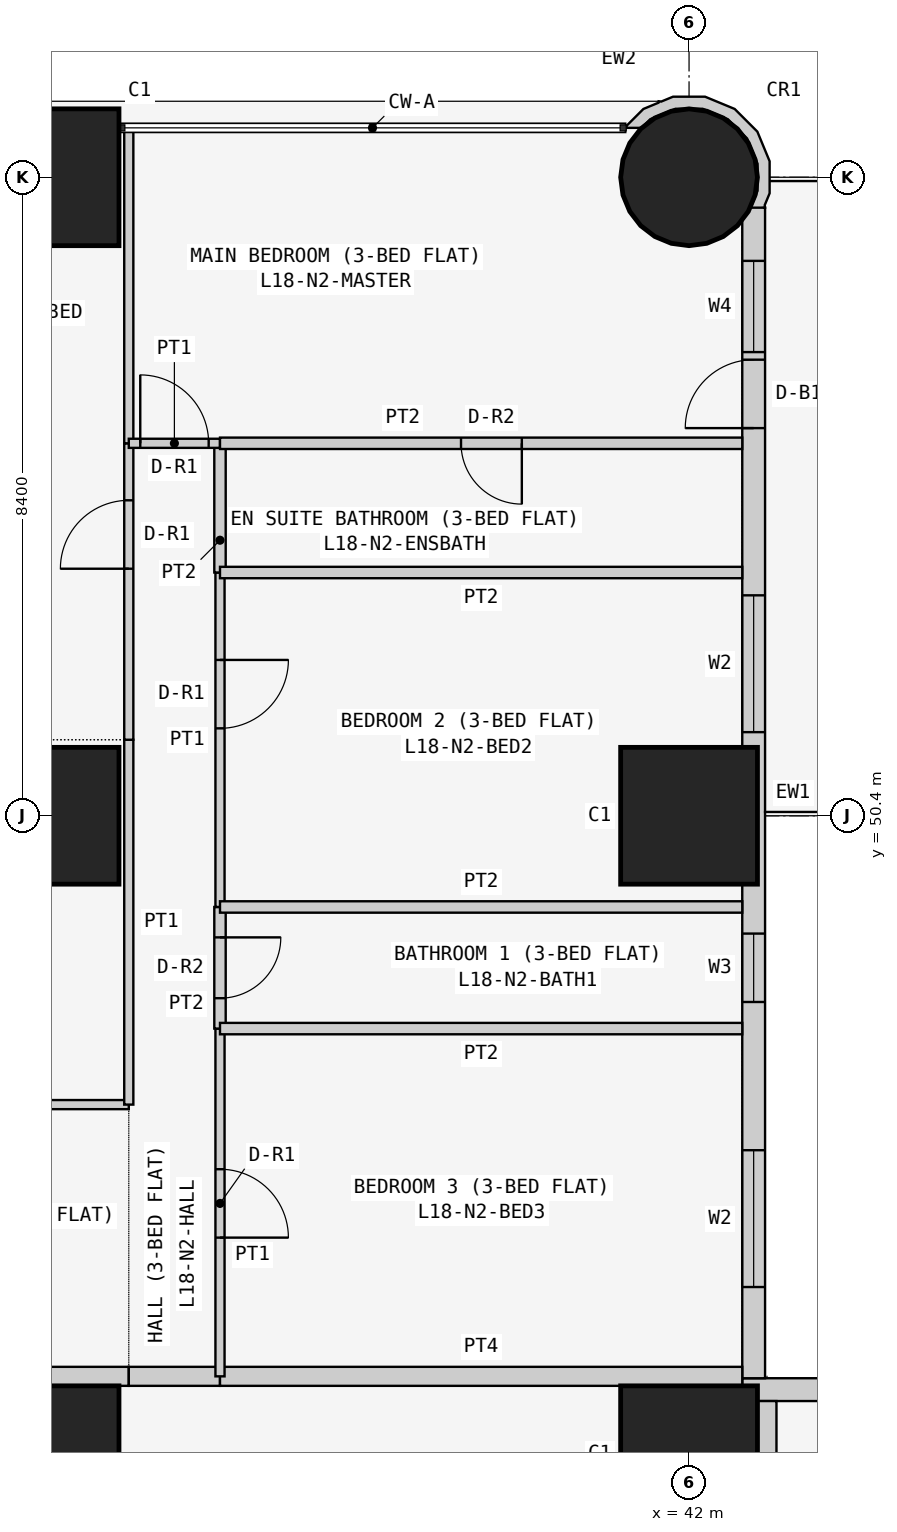
"""IFC4 building model, lengths in metres.
Left out: names, types, materials, properties, quantities, classifications, styles, units other than length and angle.
Written with IfcOpenShell. Run it as: python <this file> out.ifc"""

import sys

from ifc_helpers import new_model, si_unit, direction, frame, frame_2d, origin, origin_2d, place, context, subcontext, project, spatial, polyline, rectangle, circle, outline, extrude, element, fill, save


model = new_model("IFC4")
c1 = context("Model", 3, precision=1e-05, world=origin(), true_north=direction((0.0, 1.0)))
c2 = subcontext(c1, "Body", "Model", "MODEL_VIEW")
j1 = project(units=[si_unit("LENGTHUNIT", "METRE"), si_unit("PLANEANGLEUNIT", "RADIAN")], contexts=[c1])
p1 = place(None, origin())
s1 = spatial("IfcSite", under=j1, at=p1, CompositionType="ELEMENT")
p2 = place(p1, origin())
s2 = spatial("IfcBuilding", under=s1, at=p2, CompositionType="ELEMENT")
p3 = place(p2, frame((0.0, 0.0, 74.1)))
s3 = spatial("IfcBuildingStorey", under=s2, at=p3, CompositionType="ELEMENT", Elevation=74.1)
for number, where, z_axis, x_axis in (
    (1, (33.6, 42.0, 0.0), (0.0, 0.0, 1.0), (1.0, 0.0, 0.0)),
    (2, (33.6, 50.4, 0.0), (0.0, 0.0, 1.0), (1.0, 0.0, 0.0)),
    (3, (33.6, 58.8, 0.0), (0.0, 0.0, 1.0), (1.0, 0.0, 0.0)),
    (4, (42.0, 42.0, 0.0), (0.0, 0.0, 1.0), (1.0, 0.0, 0.0)),
    (5, (42.0, 50.4, 0.0), (0.0, 0.0, 1.0), (1.0, 0.0, 0.0)),
):
    element("IfcColumn", number, at=place(p3, frame(where, z_axis=z_axis, x_axis=x_axis)), inside=s3, PredefinedType="COLUMN", context=c2, shape_type="SweptSolid", body=[
        extrude(rectangle(XDim=1.8, YDim=1.8, at=origin_2d()), origin(), (0.0, 0.0, 1.0), 3.6),
    ])
p4 = place(p3, frame((42.0, 58.8, 0.0), z_axis=(0.0, 0.0, 1.0), x_axis=(1.0, 0.0, 0.0)))
e6 = element("IfcColumn", 6, at=p4, inside=s3, PredefinedType="COLUMN", context=c2, shape_type="SweptSolid", body=[
    extrude(circle(Radius=0.9, at=origin_2d()), origin(), (0.0, 0.0, 1.0), 3.6),
])
p5 = place(p3, frame((58.4, 42.85, 0.0), z_axis=(0.0, 0.0, 1.0), x_axis=(-1.0, 0.0, 0.0)))
e7 = element("IfcWall", 7, at=p5, inside=s3, PredefinedType="SOLIDWALL", context=c2, shape_type="SweptSolid", body=[
    extrude(rectangle(XDim=15.7, YDim=0.3, at=frame_2d((7.85, 0.0))), origin(), (0.0, 0.0, 1.0), 3.45),
])
p6 = place(p5, frame((12.4, 0.0, 0.9)))
e8 = element("IfcOpeningElement", 8, at=p6, cuts=e7, PredefinedType="OPENING", context=c2, shape_type="SweptSolid", body=[
    extrude(rectangle(XDim=1.8, YDim=1.5, at=frame_2d((0.9, 0.75))), frame((0.0, 0.16, 0.0), z_axis=(0.0, -1.0, 0.0), x_axis=(1.0, 0.0, 0.0)), (0.0, 0.0, 1.0), 0.32),
])
p7 = place(p5, frame((9.55, 0.0, 1.5)))
e9 = element("IfcOpeningElement", 9, at=p7, cuts=e7, PredefinedType="OPENING", context=c2, shape_type="SweptSolid", body=[
    extrude(rectangle(XDim=0.9, YDim=0.7, at=frame_2d((0.45, 0.35))), frame((0.0, 0.16, 0.0), z_axis=(0.0, -1.0, 0.0), x_axis=(1.0, 0.0, 0.0)), (0.0, 0.0, 1.0), 0.32),
])
p8 = place(p5, frame((5.1, 0.0, 0.9)))
e10 = element("IfcOpeningElement", 10, at=p8, cuts=e7, PredefinedType="OPENING", context=c2, shape_type="SweptSolid", body=[
    extrude(rectangle(XDim=1.8, YDim=1.5, at=frame_2d((0.9, 0.75))), frame((0.0, 0.16, 0.0), z_axis=(0.0, -1.0, 0.0), x_axis=(1.0, 0.0, 0.0)), (0.0, 0.0, 1.0), 0.32),
])
p9 = place(p5, frame((2.0, 0.0, 0.0)))
e11 = element("IfcOpeningElement", 11, at=p9, cuts=e7, PredefinedType="OPENING", context=c2, shape_type="SweptSolid", body=[
    extrude(rectangle(XDim=0.9, YDim=2.4, at=frame_2d((0.45, 1.2))), frame((0.0, 0.16, 0.0), z_axis=(0.0, -1.0, 0.0), x_axis=(1.0, 0.0, 0.0)), (0.0, 0.0, 1.0), 0.32),
])
p10 = place(p5, frame((0.7, 0.0, 0.9)))
e12 = element("IfcOpeningElement", 12, at=p10, cuts=e7, PredefinedType="OPENING", context=c2, shape_type="SweptSolid", body=[
    extrude(rectangle(XDim=1.2, YDim=1.5, at=frame_2d((0.6, 0.75))), frame((0.0, 0.16, 0.0), z_axis=(0.0, -1.0, 0.0), x_axis=(1.0, 0.0, 0.0)), (0.0, 0.0, 1.0), 0.32),
])
p11 = place(p3, frame((42.85, 43.0, 0.0), z_axis=(0.0, 0.0, 1.0), x_axis=(0.0, 1.0, 0.0)))
e13 = element("IfcWall", 13, at=p11, inside=s3, PredefinedType="SOLIDWALL", context=c2, shape_type="SweptSolid", body=[
    extrude(rectangle(XDim=15.4, YDim=0.3, at=frame_2d((7.7, 0.0))), origin(), (0.0, 0.0, 1.0), 3.45),
])
p12 = place(p11, frame((1.2, 0.0, 0.9)))
e14 = element("IfcOpeningElement", 14, at=p12, cuts=e13, PredefinedType="OPENING", context=c2, shape_type="SweptSolid", body=[
    extrude(rectangle(XDim=1.8, YDim=1.5, at=frame_2d((0.9, 0.75))), frame((0.0, 0.16, 0.0), z_axis=(0.0, -1.0, 0.0), x_axis=(1.0, 0.0, 0.0)), (0.0, 0.0, 1.0), 0.32),
])
p13 = place(p11, frame((4.95, 0.0, 1.5)))
e15 = element("IfcOpeningElement", 15, at=p13, cuts=e13, PredefinedType="OPENING", context=c2, shape_type="SweptSolid", body=[
    extrude(rectangle(XDim=0.9, YDim=0.7, at=frame_2d((0.45, 0.35))), frame((0.0, 0.16, 0.0), z_axis=(0.0, -1.0, 0.0), x_axis=(1.0, 0.0, 0.0)), (0.0, 0.0, 1.0), 0.32),
])
p14 = place(p11, frame((8.5, 0.0, 0.9)))
e16 = element("IfcOpeningElement", 16, at=p14, cuts=e13, PredefinedType="OPENING", context=c2, shape_type="SweptSolid", body=[
    extrude(rectangle(XDim=1.8, YDim=1.5, at=frame_2d((0.9, 0.75))), frame((0.0, 0.16, 0.0), z_axis=(0.0, -1.0, 0.0), x_axis=(1.0, 0.0, 0.0)), (0.0, 0.0, 1.0), 0.32),
])
p15 = place(p11, frame((12.5, 0.0, 0.0)))
e17 = element("IfcOpeningElement", 17, at=p15, cuts=e13, PredefinedType="OPENING", context=c2, shape_type="SweptSolid", body=[
    extrude(rectangle(XDim=0.9, YDim=2.4, at=frame_2d((0.45, 1.2))), frame((0.0, 0.16, 0.0), z_axis=(0.0, -1.0, 0.0), x_axis=(1.0, 0.0, 0.0)), (0.0, 0.0, 1.0), 0.32),
])
p16 = place(p11, frame((13.5, 0.0, 0.9)))
e18 = element("IfcOpeningElement", 18, at=p16, cuts=e13, PredefinedType="OPENING", context=c2, shape_type="SweptSolid", body=[
    extrude(rectangle(XDim=1.2, YDim=1.5, at=frame_2d((0.6, 0.75))), frame((0.0, 0.16, 0.0), z_axis=(0.0, -1.0, 0.0), x_axis=(1.0, 0.0, 0.0)), (0.0, 0.0, 1.0), 0.32),
])
p17 = place(p3, frame((42.91, 58.436, 0.0), z_axis=(0.0, 0.0, 1.0), x_axis=(0.377204953059, 0.926129809145, 0.0)))
e19 = element("IfcWall", 19, at=p17, inside=s3, PredefinedType="SOLIDWALL", context=c2, shape_type="SweptSolid", body=[
    extrude(outline(polyline([(0.769, 1.728), (0.75, 1.723), (0.6, 1.875), (0.295, 2.004), (0.281, 1.998), (0.36, 1.803), (0.509, 1.741), (0.761, 1.486), (0.896, 1.154), (0.894, 0.795), (0.755, 0.465), (0.5, 0.213), (0.168, 0.078), (-0.1, 0.08), (0.001, -0.097), (0.03, -0.08), (0.198, -0.081), (0.589, 0.078), (0.889, 0.374), (1.052, 0.763), (1.055, 1.185), (0.896, 1.575), (0.778, 1.695), (0.769, 1.728)])), origin(), (0.0, 0.0, 1.0), 3.45),
])
p18 = place(p3, frame((29.4, 43.025, 0.0), z_axis=(0.0, 0.0, 1.0), x_axis=(1.0, 0.0, 0.0)))
e20 = element("IfcWall", 20, at=p18, inside=s3, PredefinedType="PARTITIONING", context=c2, shape_type="SweptSolid", body=[
    extrude(rectangle(XDim=5.229, YDim=0.25, at=frame_2d((2.615, 0.0))), origin(), (0.0, 0.0, 1.0), 3.45),
])
p19 = place(p18, frame((2.1, 0.0, 0.0)))
e21 = element("IfcOpeningElement", 21, at=p19, cuts=e20, PredefinedType="OPENING", context=c2, shape_type="SweptSolid", body=[
    extrude(rectangle(XDim=1.0, YDim=2.1, at=frame_2d((0.5, 1.05))), frame((0.0, 0.135, 0.0), z_axis=(0.0, -1.0, 0.0), x_axis=(1.0, 0.0, 0.0)), (0.0, 0.0, 1.0), 0.27),
])
p20 = place(p3, frame((34.629, 43.025, 0.0), z_axis=(0.0, 0.0, 1.0), x_axis=(1.0, 0.0, 0.0)))
e22 = element("IfcWall", 22, at=p20, inside=s3, PredefinedType="PARTITIONING", context=c2, shape_type="SweptSolid", body=[
    extrude(rectangle(XDim=1.2, YDim=0.25, at=frame_2d((0.6, 0.0))), origin(), (0.0, 0.0, 1.0), 3.45),
])
for number, where, z_axis, x_axis in (
    (23, (35.829, 43.025, 0.0), (0.0, 0.0, 1.0), (1.0, 0.0, 0.0)),
    (24, (43.025, 42.7, 0.0), (0.0, 0.0, 1.0), (0.0, -1.0, 0.0)),
):
    element("IfcWall", number, at=place(p3, frame(where, z_axis=z_axis, x_axis=x_axis)), inside=s3, PredefinedType="PARTITIONING", context=c2, shape_type="SweptSolid", body=[
        extrude(rectangle(XDim=6.871, YDim=0.25, at=frame_2d((3.436, 0.0))), origin(), (0.0, 0.0, 1.0), 3.45),
    ])
p21 = place(p3, frame((29.4, 46.6, 0.0), z_axis=(0.0, 0.0, 1.0), x_axis=(1.0, 0.0, 0.0)))
e25 = element("IfcWall", 25, at=p21, inside=s3, PredefinedType="PARTITIONING", context=c2, shape_type="SweptSolid", body=[
    extrude(rectangle(XDim=5.229, YDim=0.12, at=frame_2d((2.615, 0.0))), origin(), (0.0, 0.0, 1.0), 3.45),
])
p22 = place(p21, frame((1.05, 0.0, 0.0)))
e26 = element("IfcOpeningElement", 26, at=p22, cuts=e25, PredefinedType="OPENING", context=c2, shape_type="SweptSolid", body=[
    extrude(rectangle(XDim=0.9, YDim=2.1, at=frame_2d((0.45, 1.05))), frame((0.0, 0.07, 0.0), z_axis=(0.0, -1.0, 0.0), x_axis=(1.0, 0.0, 0.0)), (0.0, 0.0, 1.0), 0.14),
])
p23 = place(p3, frame((34.629, 51.4, 0.0), z_axis=(0.0, 0.0, 1.0), x_axis=(0.0, -1.0, 0.0)))
e27 = element("IfcWall", 27, at=p23, inside=s3, PredefinedType="PARTITIONING", context=c2, shape_type="SweptSolid", body=[
    extrude(rectangle(XDim=4.8, YDim=0.12, at=frame_2d((2.4, 0.0))), origin(), (0.0, 0.0, 1.0), 3.45),
])
p24 = place(p3, frame((34.629, 55.3, 0.0), z_axis=(0.0, 0.0, 1.0), x_axis=(0.0, -1.0, 0.0)))
e28 = element("IfcWall", 28, at=p24, inside=s3, PredefinedType="PARTITIONING", context=c2, shape_type="SweptSolid", body=[
    extrude(rectangle(XDim=3.9, YDim=0.12, at=frame_2d((1.95, 0.0))), origin(), (0.0, 0.0, 1.0), 3.45),
])
p25 = place(p24, frame((0.75, 0.0, 0.0)))
e29 = element("IfcOpeningElement", 29, at=p25, cuts=e28, PredefinedType="OPENING", context=c2, shape_type="SweptSolid", body=[
    extrude(rectangle(XDim=0.9, YDim=2.1, at=frame_2d((0.45, 1.05))), frame((0.0, 0.07, 0.0), z_axis=(0.0, -1.0, 0.0), x_axis=(1.0, 0.0, 0.0)), (0.0, 0.0, 1.0), 0.14),
])
p26 = place(p3, frame((34.629, 59.45, 0.0), z_axis=(0.0, 0.0, 1.0), x_axis=(0.0, -1.0, 0.0)))
e30 = element("IfcWall", 30, at=p26, inside=s3, PredefinedType="PARTITIONING", context=c2, shape_type="SweptSolid", body=[
    extrude(rectangle(XDim=4.15, YDim=0.12, at=frame_2d((2.075, 0.0))), origin(), (0.0, 0.0, 1.0), 3.45),
])
p27 = place(p3, frame((35.829, 47.6, 0.0), z_axis=(0.0, 0.0, 1.0), x_axis=(0.0, -1.0, 0.0)))
e31 = element("IfcWall", 31, at=p27, inside=s3, PredefinedType="PARTITIONING", context=c2, shape_type="SweptSolid", body=[
    extrude(rectangle(XDim=4.575, YDim=0.12, at=frame_2d((2.288, 0.0))), origin(), (0.0, 0.0, 1.0), 3.45),
])
p28 = place(p27, frame((1.85, 0.0, 0.0)))
e32 = element("IfcOpeningElement", 32, at=p28, cuts=e31, PredefinedType="OPENING", context=c2, shape_type="SweptSolid", body=[
    extrude(rectangle(XDim=0.9, YDim=2.1, at=frame_2d((0.45, 1.05))), frame((0.0, 0.07, 0.0), z_axis=(0.0, -1.0, 0.0), x_axis=(1.0, 0.0, 0.0)), (0.0, 0.0, 1.0), 0.14),
])
p29 = place(p3, frame((35.829, 49.2, 0.0), z_axis=(0.0, 0.0, 1.0), x_axis=(0.0, -1.0, 0.0)))
e33 = element("IfcWall", 33, at=p29, inside=s3, PredefinedType="PARTITIONING", context=c2, shape_type="SweptSolid", body=[
    extrude(rectangle(XDim=1.6, YDim=0.15, at=frame_2d((0.8, 0.0))), origin(), (0.0, 0.0, 1.0), 3.45),
])
p30 = place(p29, frame((0.4, 0.0, 0.0)))
e34 = element("IfcOpeningElement", 34, at=p30, cuts=e33, PredefinedType="OPENING", context=c2, shape_type="SweptSolid", body=[
    extrude(rectangle(XDim=0.8, YDim=2.1, at=frame_2d((0.4, 1.05))), frame((0.0, 0.085, 0.0), z_axis=(0.0, -1.0, 0.0), x_axis=(1.0, 0.0, 0.0)), (0.0, 0.0, 1.0), 0.17),
])
p31 = place(p3, frame((35.829, 53.6, 0.0), z_axis=(0.0, 0.0, 1.0), x_axis=(0.0, -1.0, 0.0)))
e35 = element("IfcWall", 35, at=p31, inside=s3, PredefinedType="PARTITIONING", context=c2, shape_type="SweptSolid", body=[
    extrude(rectangle(XDim=4.4, YDim=0.12, at=frame_2d((2.2, 0.0))), origin(), (0.0, 0.0, 1.0), 3.45),
])
p32 = place(p31, frame((1.15, 0.0, 0.0)))
e36 = element("IfcOpeningElement", 36, at=p32, cuts=e35, PredefinedType="OPENING", context=c2, shape_type="SweptSolid", body=[
    extrude(rectangle(XDim=0.9, YDim=2.1, at=frame_2d((0.45, 1.05))), frame((0.0, 0.07, 0.0), z_axis=(0.0, -1.0, 0.0), x_axis=(1.0, 0.0, 0.0)), (0.0, 0.0, 1.0), 0.14),
])
p33 = place(p3, frame((35.829, 55.3, 0.0), z_axis=(0.0, 0.0, 1.0), x_axis=(0.0, -1.0, 0.0)))
e37 = element("IfcWall", 37, at=p33, inside=s3, PredefinedType="PARTITIONING", context=c2, shape_type="SweptSolid", body=[
    extrude(rectangle(XDim=1.7, YDim=0.15, at=frame_2d((0.85, 0.0))), origin(), (0.0, 0.0, 1.0), 3.45),
])
p34 = place(p3, frame((34.629, 55.3, 0.0), z_axis=(0.0, 0.0, 1.0), x_axis=(1.0, 0.0, 0.0)))
e38 = element("IfcWall", 38, at=p34, inside=s3, PredefinedType="PARTITIONING", context=c2, shape_type="SweptSolid", body=[
    extrude(rectangle(XDim=1.2, YDim=0.12, at=frame_2d((0.6, 0.0))), origin(), (0.0, 0.0, 1.0), 3.45),
])
p35 = place(p34, frame((0.151, 0.0, 0.0)))
e39 = element("IfcOpeningElement", 39, at=p35, cuts=e38, PredefinedType="OPENING", context=c2, shape_type="SweptSolid", body=[
    extrude(rectangle(XDim=0.9, YDim=2.1, at=frame_2d((0.45, 1.05))), frame((0.0, 0.07, 0.0), z_axis=(0.0, -1.0, 0.0), x_axis=(1.0, 0.0, 0.0)), (0.0, 0.0, 1.0), 0.14),
])
for number, where, z_axis, x_axis in (
    (40, (35.829, 47.6, 0.0), (0.0, 0.0, 1.0), (1.0, 0.0, 0.0)),
    (41, (35.829, 49.2, 0.0), (0.0, 0.0, 1.0), (1.0, 0.0, 0.0)),
    (42, (35.829, 53.6, 0.0), (0.0, 0.0, 1.0), (1.0, 0.0, 0.0)),
):
    element("IfcWall", number, at=place(p3, frame(where, z_axis=z_axis, x_axis=x_axis)), inside=s3, PredefinedType="PARTITIONING", context=c2, shape_type="SweptSolid", body=[
        extrude(rectangle(XDim=6.871, YDim=0.15, at=frame_2d((3.436, 0.0))), origin(), (0.0, 0.0, 1.0), 3.45),
    ])
p36 = place(p3, frame((35.829, 55.3, 0.0), z_axis=(0.0, 0.0, 1.0), x_axis=(1.0, 0.0, 0.0)))
e43 = element("IfcWall", 43, at=p36, inside=s3, PredefinedType="PARTITIONING", context=c2, shape_type="SweptSolid", body=[
    extrude(rectangle(XDim=6.871, YDim=0.15, at=frame_2d((3.436, 0.0))), origin(), (0.0, 0.0, 1.0), 3.45),
])
p37 = place(p36, frame((3.171, 0.0, 0.0)))
e44 = element("IfcOpeningElement", 44, at=p37, cuts=e43, PredefinedType="OPENING", context=c2, shape_type="SweptSolid", body=[
    extrude(rectangle(XDim=0.8, YDim=2.1, at=frame_2d((0.4, 1.05))), frame((0.0, 0.085, 0.0), z_axis=(0.0, -1.0, 0.0), x_axis=(1.0, 0.0, 0.0)), (0.0, 0.0, 1.0), 0.17),
])
p38 = place(p12, origin())
e45 = element("IfcWindow", 45, at=p38, inside=s3, PartitioningType="SINGLE_PANEL", PredefinedType="WINDOW", context=c2, shape_type="SweptSolid", body=[
    extrude(rectangle(XDim=1.8, YDim=1.5, at=frame_2d((0.9, 0.75))), frame((0.0, 0.03, 0.0), z_axis=(0.0, -1.0, 0.0), x_axis=(1.0, 0.0, 0.0)), (0.0, 0.0, 1.0), 0.06),
])
fill(e14, e45)
p39 = place(p13, origin())
e46 = element("IfcWindow", 46, at=p39, inside=s3, PartitioningType="SINGLE_PANEL", PredefinedType="WINDOW", context=c2, shape_type="SweptSolid", body=[
    extrude(rectangle(XDim=0.9, YDim=0.7, at=frame_2d((0.45, 0.35))), frame((0.0, 0.03, 0.0), z_axis=(0.0, -1.0, 0.0), x_axis=(1.0, 0.0, 0.0)), (0.0, 0.0, 1.0), 0.06),
])
fill(e15, e46)
p40 = place(p14, origin())
e47 = element("IfcWindow", 47, at=p40, inside=s3, PartitioningType="SINGLE_PANEL", PredefinedType="WINDOW", context=c2, shape_type="SweptSolid", body=[
    extrude(rectangle(XDim=1.8, YDim=1.5, at=frame_2d((0.9, 0.75))), frame((0.0, 0.03, 0.0), z_axis=(0.0, -1.0, 0.0), x_axis=(1.0, 0.0, 0.0)), (0.0, 0.0, 1.0), 0.06),
])
fill(e16, e47)
p41 = place(p15, origin())
e48 = element("IfcDoor", 48, at=p41, inside=s3, OperationType="SINGLE_SWING_LEFT", PredefinedType="DOOR", context=c2, shape_type="SweptSolid", body=[
    extrude(rectangle(XDim=0.9, YDim=2.4, at=frame_2d((0.45, 1.2))), frame((0.0, 0.025, 0.0), z_axis=(0.0, -1.0, 0.0), x_axis=(1.0, 0.0, 0.0)), (0.0, 0.0, 1.0), 0.05),
])
fill(e17, e48)
p42 = place(p16, origin())
e49 = element("IfcWindow", 49, at=p42, inside=s3, PartitioningType="SINGLE_PANEL", PredefinedType="WINDOW", context=c2, shape_type="SweptSolid", body=[
    extrude(rectangle(XDim=1.2, YDim=1.5, at=frame_2d((0.6, 0.75))), frame((0.0, 0.03, 0.0), z_axis=(0.0, -1.0, 0.0), x_axis=(1.0, 0.0, 0.0)), (0.0, 0.0, 1.0), 0.06),
])
fill(e18, e49)
p43 = place(p25, frame((0.9, 0.0, 0.0), z_axis=(0.0, 0.0, 1.0), x_axis=(-1.0, 0.0, 0.0)))
e50 = element("IfcDoor", 50, at=p43, inside=s3, OperationType="SINGLE_SWING_LEFT", PredefinedType="DOOR", context=c2, shape_type="SweptSolid", body=[
    extrude(rectangle(XDim=0.9, YDim=2.1, at=frame_2d((0.45, 1.05))), frame((0.0, 0.025, 0.0), z_axis=(0.0, -1.0, 0.0), x_axis=(1.0, 0.0, 0.0)), (0.0, 0.0, 1.0), 0.05),
])
fill(e29, e50)
p44 = place(p28, origin())
e51 = element("IfcDoor", 51, at=p44, inside=s3, OperationType="SINGLE_SWING_RIGHT", PredefinedType="DOOR", context=c2, shape_type="SweptSolid", body=[
    extrude(rectangle(XDim=0.9, YDim=2.1, at=frame_2d((0.45, 1.05))), frame((0.0, 0.025, 0.0), z_axis=(0.0, -1.0, 0.0), x_axis=(1.0, 0.0, 0.0)), (0.0, 0.0, 1.0), 0.05),
])
fill(e32, e51)
p45 = place(p30, origin())
e52 = element("IfcDoor", 52, at=p45, inside=s3, OperationType="SINGLE_SWING_LEFT", PredefinedType="DOOR", context=c2, shape_type="SweptSolid", body=[
    extrude(rectangle(XDim=0.8, YDim=2.1, at=frame_2d((0.4, 1.05))), frame((0.0, 0.025, 0.0), z_axis=(0.0, -1.0, 0.0), x_axis=(1.0, 0.0, 0.0)), (0.0, 0.0, 1.0), 0.05),
])
fill(e34, e52)
p46 = place(p32, origin())
e53 = element("IfcDoor", 53, at=p46, inside=s3, OperationType="SINGLE_SWING_LEFT", PredefinedType="DOOR", context=c2, shape_type="SweptSolid", body=[
    extrude(rectangle(XDim=0.9, YDim=2.1, at=frame_2d((0.45, 1.05))), frame((0.0, 0.025, 0.0), z_axis=(0.0, -1.0, 0.0), x_axis=(1.0, 0.0, 0.0)), (0.0, 0.0, 1.0), 0.05),
])
fill(e36, e53)
p47 = place(p35, origin())
e54 = element("IfcDoor", 54, at=p47, inside=s3, OperationType="SINGLE_SWING_LEFT", PredefinedType="DOOR", context=c2, shape_type="SweptSolid", body=[
    extrude(rectangle(XDim=0.9, YDim=2.1, at=frame_2d((0.45, 1.05))), frame((0.0, 0.025, 0.0), z_axis=(0.0, -1.0, 0.0), x_axis=(1.0, 0.0, 0.0)), (0.0, 0.0, 1.0), 0.05),
])
fill(e39, e54)
p48 = place(p37, frame((0.8, 0.0, 0.0), z_axis=(0.0, 0.0, 1.0), x_axis=(-1.0, 0.0, 0.0)))
e55 = element("IfcDoor", 55, at=p48, inside=s3, OperationType="SINGLE_SWING_LEFT", PredefinedType="DOOR", context=c2, shape_type="SweptSolid", body=[
    extrude(rectangle(XDim=0.8, YDim=2.1, at=frame_2d((0.4, 1.05))), frame((0.0, 0.025, 0.0), z_axis=(0.0, -1.0, 0.0), x_axis=(1.0, 0.0, 0.0)), (0.0, 0.0, 1.0), 0.05),
])
fill(e44, e55)
save(model, sys.argv[1])
